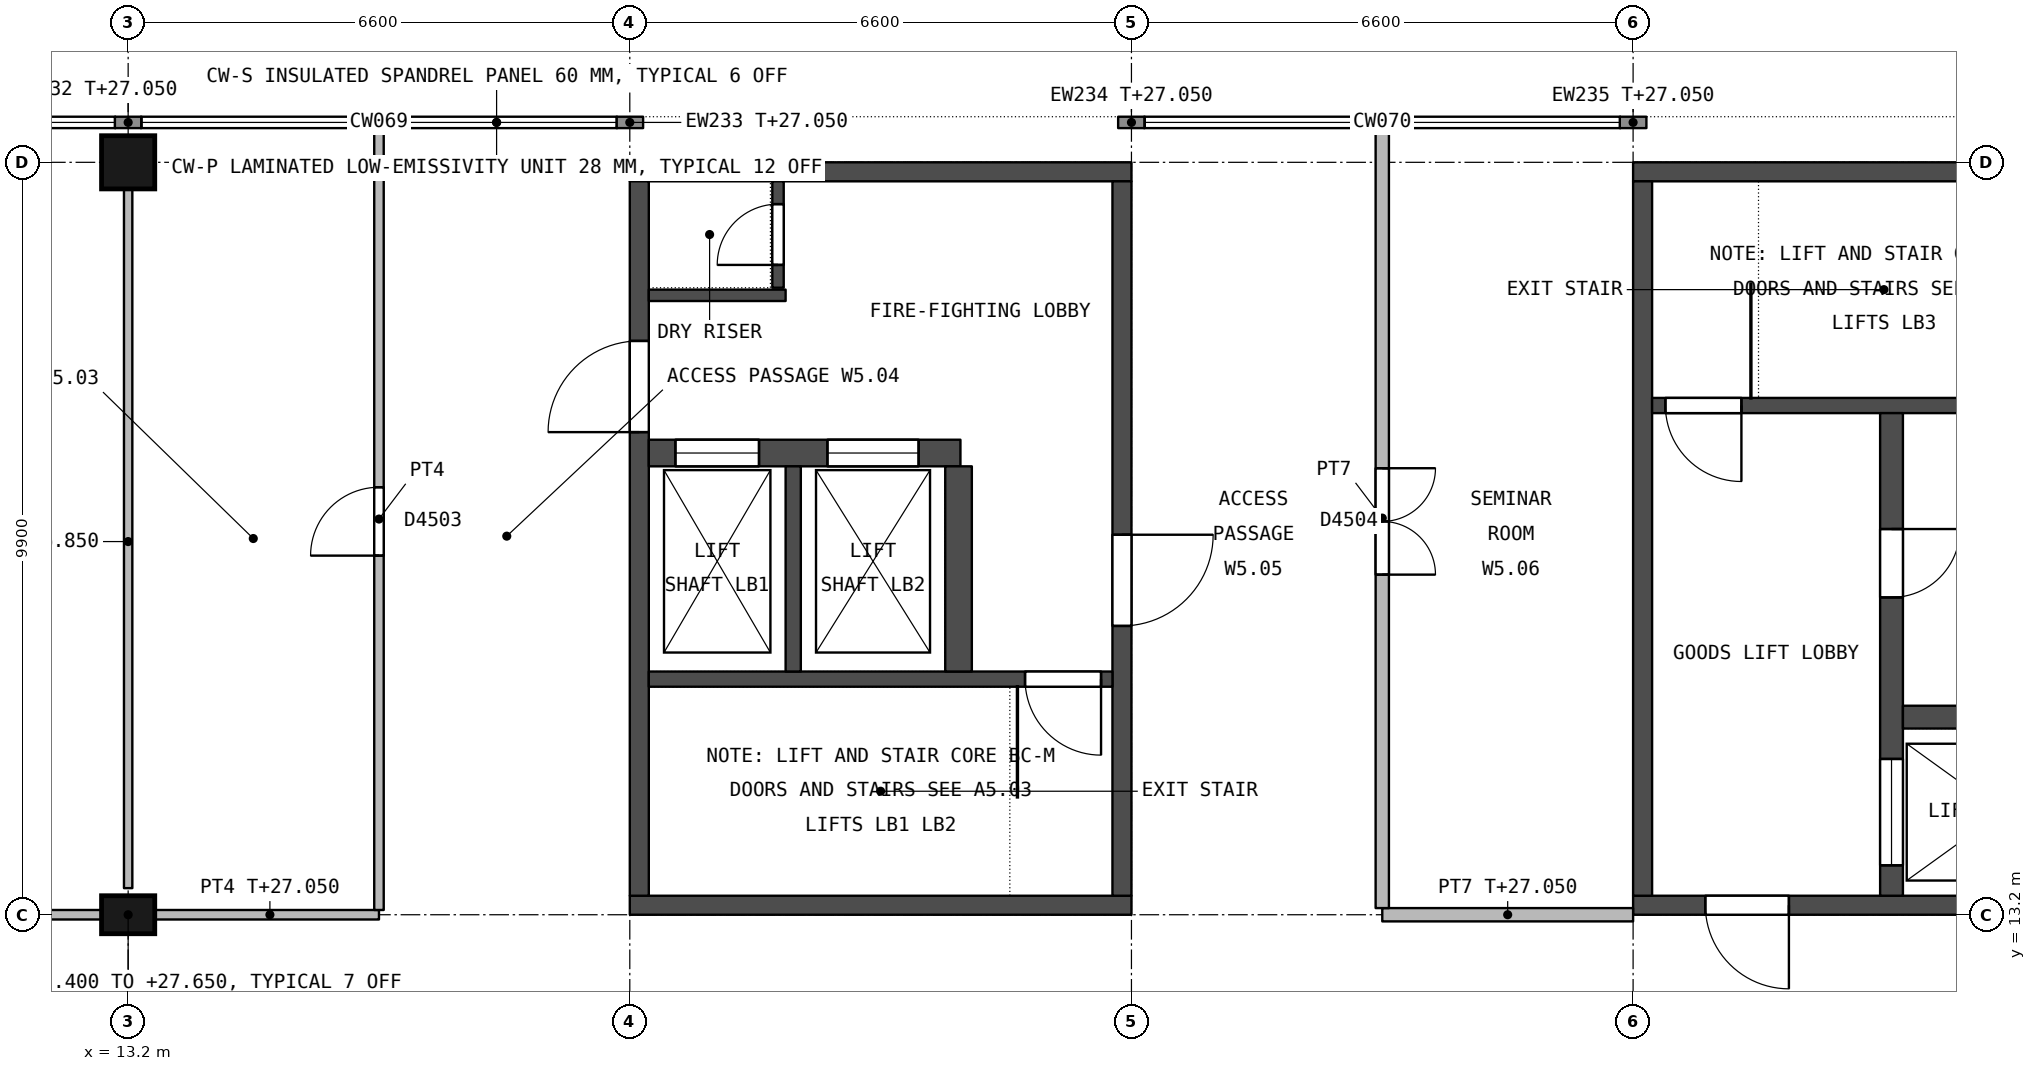
"""IFC4 building model, lengths in metres.
Left out: names, types, materials, properties, quantities, classifications, styles, units other than length and angle.
Written with IfcOpenShell. Run it as: python <this file> out.ifc"""

import sys

from ifc_helpers import new_model, si_unit, direction, frame, frame_2d, origin, origin_2d, place, context, subcontext, project, spatial, rectangle, extrude, element, fill, save


model = new_model("IFC4")
c1 = context("Model", 3, precision=1e-05, world=origin(), true_north=direction((0.0, 1.0)))
c2 = subcontext(c1, "Body", "Model", "MODEL_VIEW")
j1 = project(units=[si_unit("LENGTHUNIT", "METRE"), si_unit("PLANEANGLEUNIT", "RADIAN")], contexts=[c1])
p1 = place(None, origin())
s1 = spatial("IfcSite", under=j1, at=p1, CompositionType="ELEMENT")
p2 = place(p1, origin())
s2 = spatial("IfcBuilding", under=s1, at=p2, CompositionType="ELEMENT")
p3 = place(p2, frame((0.0, 0.0, 23.4)))
s3 = spatial("IfcBuildingStorey", under=s2, at=p3, CompositionType="ELEMENT", Elevation=23.4)
p4 = place(p3, frame((13.2, 13.2, 0.0), z_axis=(0.0, 0.0, 1.0), x_axis=(1.0, 0.0, 0.0)))
e1 = element("IfcColumn", 1, at=p4, inside=s3, PredefinedType="COLUMN", context=c2, shape_type="SweptSolid", body=[
    extrude(rectangle(XDim=0.7, YDim=0.5, at=origin_2d()), origin(), (0.0, 0.0, 1.0), 4.25),
])
p5 = place(p3, frame((13.2, 23.1, 0.0), z_axis=(0.0, 0.0, 1.0), x_axis=(1.0, 0.0, 0.0)))
e2 = element("IfcColumn", 2, at=p5, inside=s3, PredefinedType="COLUMN", context=c2, shape_type="SweptSolid", body=[
    extrude(rectangle(XDim=0.7, YDim=0.7, at=origin_2d()), origin(), (0.0, 0.0, 1.0), 4.25),
])
for number, where, z_axis, x_axis in (
    (3, (19.8, 13.325, 0.0), (0.0, 0.0, 1.0), (1.0, 0.0, 0.0)),
    (4, (19.8, 22.975, 0.0), (0.0, 0.0, 1.0), (1.0, 0.0, 0.0)),
):
    element("IfcWall", number, at=place(p3, frame(where, z_axis=z_axis, x_axis=x_axis)), inside=s3, PredefinedType="SHEAR", context=c2, shape_type="SweptSolid", body=[
        extrude(rectangle(XDim=6.6, YDim=0.25, at=frame_2d((3.3, 0.0))), origin(), (0.0, 0.0, 1.0), 4.25),
    ])
p6 = place(p3, frame((19.925, 13.45, 0.0), z_axis=(0.0, 0.0, 1.0), x_axis=(0.0, 1.0, 0.0)))
e5 = element("IfcWall", 5, at=p6, inside=s3, PredefinedType="SHEAR", context=c2, shape_type="SweptSolid", body=[
    extrude(rectangle(XDim=9.4, YDim=0.25, at=frame_2d((4.7, 0.0))), origin(), (0.0, 0.0, 1.0), 4.25),
])
p7 = place(p6, frame((6.1, 0.0, 0.0)))
e6 = element("IfcOpeningElement", 6, at=p7, cuts=e5, PredefinedType="OPENING", context=c2, shape_type="SweptSolid", body=[
    extrude(rectangle(XDim=1.2, YDim=2.1, at=frame_2d((0.6, 1.05))), frame((0.0, 0.135, 0.0), z_axis=(0.0, -1.0, 0.0), x_axis=(1.0, 0.0, 0.0)), (0.0, 0.0, 1.0), 0.27),
])
p8 = place(p3, frame((26.275, 13.45, 0.0), z_axis=(0.0, 0.0, 1.0), x_axis=(0.0, 1.0, 0.0)))
e7 = element("IfcWall", 7, at=p8, inside=s3, PredefinedType="SHEAR", context=c2, shape_type="SweptSolid", body=[
    extrude(rectangle(XDim=9.4, YDim=0.25, at=frame_2d((4.7, 0.0))), origin(), (0.0, 0.0, 1.0), 4.25),
])
p9 = place(p8, frame((3.55, 0.0, 0.0)))
e8 = element("IfcOpeningElement", 8, at=p9, cuts=e7, PredefinedType="OPENING", context=c2, shape_type="SweptSolid", body=[
    extrude(rectangle(XDim=1.2, YDim=2.1, at=frame_2d((0.6, 1.05))), frame((0.0, 0.135, 0.0), z_axis=(0.0, -1.0, 0.0), x_axis=(1.0, 0.0, 0.0)), (0.0, 0.0, 1.0), 0.27),
])
p10 = place(p3, frame((20.05, 16.3, 0.0), z_axis=(0.0, 0.0, 1.0), x_axis=(1.0, 0.0, 0.0)))
e9 = element("IfcWall", 9, at=p10, inside=s3, PredefinedType="SHEAR", context=c2, shape_type="SweptSolid", body=[
    extrude(rectangle(XDim=6.1, YDim=0.2, at=frame_2d((3.05, 0.0))), origin(), (0.0, 0.0, 1.0), 4.25),
])
p11 = place(p10, frame((4.95, 0.0, 0.0)))
e10 = element("IfcOpeningElement", 10, at=p11, cuts=e9, PredefinedType="OPENING", context=c2, shape_type="SweptSolid", body=[
    extrude(rectangle(XDim=1.0, YDim=2.2, at=frame_2d((0.5, 1.1))), frame((0.0, 0.11, 0.0), z_axis=(0.0, -1.0, 0.0), x_axis=(1.0, 0.0, 0.0)), (0.0, 0.0, 1.0), 0.22),
])
p12 = place(p3, frame((20.05, 19.275, 0.0), z_axis=(0.0, 0.0, 1.0), x_axis=(1.0, 0.0, 0.0)))
e11 = element("IfcWall", 11, at=p12, inside=s3, PredefinedType="SHEAR", context=c2, shape_type="SweptSolid", body=[
    extrude(rectangle(XDim=4.1, YDim=0.35, at=frame_2d((2.05, 0.0))), origin(), (0.0, 0.0, 1.0), 4.25),
])
p13 = place(p12, frame((0.35, 0.0, 0.0)))
e12 = element("IfcOpeningElement", 12, at=p13, cuts=e11, PredefinedType="OPENING", context=c2, shape_type="SweptSolid", body=[
    extrude(rectangle(XDim=1.1, YDim=2.2, at=frame_2d((0.55, 1.1))), frame((0.0, 0.185, 0.0), z_axis=(0.0, -1.0, 0.0), x_axis=(1.0, 0.0, 0.0)), (0.0, 0.0, 1.0), 0.37),
])
p14 = place(p12, frame((2.35, 0.0, 0.0)))
e13 = element("IfcOpeningElement", 13, at=p14, cuts=e11, PredefinedType="OPENING", context=c2, shape_type="SweptSolid", body=[
    extrude(rectangle(XDim=1.2, YDim=2.3, at=frame_2d((0.6, 1.15))), frame((0.0, 0.185, 0.0), z_axis=(0.0, -1.0, 0.0), x_axis=(1.0, 0.0, 0.0)), (0.0, 0.0, 1.0), 0.37),
])
p15 = place(p3, frame((21.95, 16.4, 0.0), z_axis=(0.0, 0.0, 1.0), x_axis=(0.0, 1.0, 0.0)))
e14 = element("IfcWall", 14, at=p15, inside=s3, PredefinedType="SHEAR", context=c2, shape_type="SweptSolid", body=[
    extrude(rectangle(XDim=2.7, YDim=0.2, at=frame_2d((1.35, 0.0))), origin(), (0.0, 0.0, 1.0), 4.25),
])
p16 = place(p3, frame((24.125, 16.4, 0.0), z_axis=(0.0, 0.0, 1.0), x_axis=(0.0, 1.0, 0.0)))
e15 = element("IfcWall", 15, at=p16, inside=s3, PredefinedType="SHEAR", context=c2, shape_type="SweptSolid", body=[
    extrude(rectangle(XDim=2.7, YDim=0.35, at=frame_2d((1.35, 0.0))), origin(), (0.0, 0.0, 1.0), 4.25),
])
p17 = place(p3, frame((20.05, 21.35, 0.0), z_axis=(0.0, 0.0, 1.0), x_axis=(1.0, 0.0, 0.0)))
e16 = element("IfcWall", 16, at=p17, inside=s3, PredefinedType="SHEAR", context=c2, shape_type="SweptSolid", body=[
    extrude(rectangle(XDim=1.8, YDim=0.15, at=frame_2d((0.9, 0.0))), origin(), (0.0, 0.0, 1.0), 4.25),
])
p18 = place(p3, frame((21.75, 21.45, 0.0), z_axis=(0.0, 0.0, 1.0), x_axis=(0.0, 1.0, 0.0)))
e17 = element("IfcWall", 17, at=p18, inside=s3, PredefinedType="SHEAR", context=c2, shape_type="SweptSolid", body=[
    extrude(rectangle(XDim=1.4, YDim=0.15, at=frame_2d((0.7, 0.0))), origin(), (0.0, 0.0, 1.0), 4.25),
])
p19 = place(p18, frame((0.3, 0.0, 0.0)))
e18 = element("IfcOpeningElement", 18, at=p19, cuts=e17, PredefinedType="OPENING", context=c2, shape_type="SweptSolid", body=[
    extrude(rectangle(XDim=0.8, YDim=2.0, at=frame_2d((0.4, 1.0))), frame((0.0, 0.085, 0.0), z_axis=(0.0, -1.0, 0.0), x_axis=(1.0, 0.0, 0.0)), (0.0, 0.0, 1.0), 0.17),
])
p20 = place(p3, frame((33.0, 13.325, 0.0), z_axis=(0.0, 0.0, 1.0), x_axis=(1.0, 0.0, 0.0)))
e19 = element("IfcWall", 19, at=p20, inside=s3, PredefinedType="SHEAR", context=c2, shape_type="SweptSolid", body=[
    extrude(rectangle(XDim=6.6, YDim=0.25, at=frame_2d((3.3, 0.0))), origin(), (0.0, 0.0, 1.0), 4.25),
])
p21 = place(p20, frame((0.95, 0.0, 0.0)))
e20 = element("IfcOpeningElement", 20, at=p21, cuts=e19, PredefinedType="OPENING", context=c2, shape_type="SweptSolid", body=[
    extrude(rectangle(XDim=1.1, YDim=2.1, at=frame_2d((0.55, 1.05))), frame((0.0, 0.135, 0.0), z_axis=(0.0, -1.0, 0.0), x_axis=(1.0, 0.0, 0.0)), (0.0, 0.0, 1.0), 0.27),
])
p22 = place(p3, frame((33.0, 22.975, 0.0), z_axis=(0.0, 0.0, 1.0), x_axis=(1.0, 0.0, 0.0)))
e21 = element("IfcWall", 21, at=p22, inside=s3, PredefinedType="SHEAR", context=c2, shape_type="SweptSolid", body=[
    extrude(rectangle(XDim=6.6, YDim=0.25, at=frame_2d((3.3, 0.0))), origin(), (0.0, 0.0, 1.0), 4.25),
])
p23 = place(p3, frame((33.125, 13.45, 0.0), z_axis=(0.0, 0.0, 1.0), x_axis=(0.0, 1.0, 0.0)))
e22 = element("IfcWall", 22, at=p23, inside=s3, PredefinedType="SHEAR", context=c2, shape_type="SweptSolid", body=[
    extrude(rectangle(XDim=9.4, YDim=0.25, at=frame_2d((4.7, 0.0))), origin(), (0.0, 0.0, 1.0), 4.25),
])
p24 = place(p3, frame((33.25, 19.9, 0.0), z_axis=(0.0, 0.0, 1.0), x_axis=(1.0, 0.0, 0.0)))
e23 = element("IfcWall", 23, at=p24, inside=s3, PredefinedType="SHEAR", context=c2, shape_type="SweptSolid", body=[
    extrude(rectangle(XDim=6.1, YDim=0.2, at=frame_2d((3.05, 0.0))), origin(), (0.0, 0.0, 1.0), 4.25),
])
p25 = place(p24, frame((0.175, 0.0, 0.0)))
e24 = element("IfcOpeningElement", 24, at=p25, cuts=e23, PredefinedType="OPENING", context=c2, shape_type="SweptSolid", body=[
    extrude(rectangle(XDim=1.0, YDim=2.1, at=frame_2d((0.5, 1.05))), frame((0.0, 0.11, 0.0), z_axis=(0.0, -1.0, 0.0), x_axis=(1.0, 0.0, 0.0)), (0.0, 0.0, 1.0), 0.22),
])
p26 = place(p3, frame((36.4, 13.45, 0.0), z_axis=(0.0, 0.0, 1.0), x_axis=(0.0, 1.0, 0.0)))
e25 = element("IfcWall", 25, at=p26, inside=s3, PredefinedType="SHEAR", context=c2, shape_type="SweptSolid", body=[
    extrude(rectangle(XDim=6.35, YDim=0.3, at=frame_2d((3.175, 0.0))), origin(), (0.0, 0.0, 1.0), 4.25),
])
p27 = place(p26, frame((3.925, 0.0, 0.0)))
e26 = element("IfcOpeningElement", 26, at=p27, cuts=e25, PredefinedType="OPENING", context=c2, shape_type="SweptSolid", body=[
    extrude(rectangle(XDim=0.9, YDim=2.1, at=frame_2d((0.45, 1.05))), frame((0.0, 0.16, 0.0), z_axis=(0.0, -1.0, 0.0), x_axis=(1.0, 0.0, 0.0)), (0.0, 0.0, 1.0), 0.32),
])
p28 = place(p26, frame((0.4, 0.0, 0.0)))
e27 = element("IfcOpeningElement", 27, at=p28, cuts=e25, PredefinedType="OPENING", context=c2, shape_type="SweptSolid", body=[
    extrude(rectangle(XDim=1.4, YDim=2.4, at=frame_2d((0.7, 1.2))), frame((0.0, 0.16, 0.0), z_axis=(0.0, -1.0, 0.0), x_axis=(1.0, 0.0, 0.0)), (0.0, 0.0, 1.0), 0.32),
])
p29 = place(p3, frame((36.55, 15.8, 0.0), z_axis=(0.0, 0.0, 1.0), x_axis=(1.0, 0.0, 0.0)))
e28 = element("IfcWall", 28, at=p29, inside=s3, PredefinedType="SHEAR", context=c2, shape_type="SweptSolid", body=[
    extrude(rectangle(XDim=2.8, YDim=0.3, at=frame_2d((1.4, 0.0))), origin(), (0.0, 0.0, 1.0), 4.25),
])
for number, where, z_axis, x_axis in (
    (29, (13.025, 23.625, 0.0), (0.0, 0.0, 1.0), (1.0, 0.0, 0.0)),
    (30, (19.625, 23.625, 0.0), (0.0, 0.0, 1.0), (1.0, 0.0, 0.0)),
):
    element("IfcWall", number, at=place(p3, frame(where, z_axis=z_axis, x_axis=x_axis)), inside=s3, PredefinedType="STANDARD", context=c2, shape_type="SweptSolid", body=[
        extrude(rectangle(XDim=0.35, YDim=0.15, at=frame_2d((0.175, 0.0))), origin(), (0.0, 0.0, 1.0), 3.65),
    ])
p30 = place(p3, frame((26.225, 23.625, 0.0), z_axis=(0.0, 0.0, 1.0), x_axis=(1.0, 0.0, 0.0)))
e31 = element("IfcWall", 31, at=p30, inside=s3, PredefinedType="STANDARD", context=c2, shape_type="SweptSolid", body=[
    extrude(rectangle(XDim=0.35, YDim=0.15, at=frame_2d((0.175, 0.0))), origin(), (0.0, 0.0, 1.0), 3.65),
])
p31 = place(p3, frame((32.825, 23.625, 0.0), z_axis=(0.0, 0.0, 1.0), x_axis=(1.0, 0.0, 0.0)))
e32 = element("IfcWall", 32, at=p31, inside=s3, PredefinedType="STANDARD", context=c2, shape_type="SweptSolid", body=[
    extrude(rectangle(XDim=0.35, YDim=0.15, at=frame_2d((0.175, 0.0))), origin(), (0.0, 0.0, 1.0), 3.65),
])
p32 = place(p3, frame((6.6, 13.2, 0.0), z_axis=(0.0, 0.0, 1.0), x_axis=(1.0, 0.0, 0.0)))
e33 = element("IfcWall", 33, at=p32, inside=s3, PredefinedType="PARTITIONING", context=c2, shape_type="SweptSolid", body=[
    extrude(rectangle(XDim=6.25, YDim=0.125, at=frame_2d((3.125, 0.0))), origin(), (0.0, 0.0, 1.0), 3.65),
])
p33 = place(p32, frame((2.85, 0.0, 0.0)))
e34 = element("IfcOpeningElement", 34, at=p33, cuts=e33, PredefinedType="OPENING", context=c2, shape_type="SweptSolid", body=[
    extrude(rectangle(XDim=0.9, YDim=2.1, at=frame_2d((0.45, 1.05))), frame((0.0, 0.073, 0.0), z_axis=(0.0, -1.0, 0.0), x_axis=(1.0, 0.0, 0.0)), (0.0, 0.0, 1.0), 0.145),
])
p34 = place(p3, frame((16.5, 13.2, 0.0), z_axis=(0.0, 0.0, 1.0), x_axis=(-1.0, 0.0, 0.0)))
e35 = element("IfcWall", 35, at=p34, inside=s3, PredefinedType="PARTITIONING", context=c2, shape_type="SweptSolid", body=[
    extrude(rectangle(XDim=2.95, YDim=0.125, at=frame_2d((1.475, 0.0))), origin(), (0.0, 0.0, 1.0), 3.65),
])
p35 = place(p3, frame((33.0, 13.2, 0.0), z_axis=(0.0, 0.0, 1.0), x_axis=(-1.0, 0.0, 0.0)))
e36 = element("IfcWall", 36, at=p35, inside=s3, PredefinedType="PARTITIONING", context=c2, shape_type="SweptSolid", body=[
    extrude(rectangle(XDim=3.3, YDim=0.175, at=frame_2d((1.65, 0.0))), origin(), (0.0, 0.0, 1.0), 3.65),
])
p36 = place(p3, frame((13.2, 13.55, 0.0), z_axis=(0.0, 0.0, 1.0), x_axis=(0.0, 1.0, 0.0)))
e37 = element("IfcWall", 37, at=p36, inside=s3, PredefinedType="PARTITIONING", context=c2, shape_type="SweptSolid", body=[
    extrude(rectangle(XDim=9.2, YDim=0.11, at=frame_2d((4.6, 0.0))), origin(), (0.0, 0.0, 1.0), 3.45),
])
p37 = place(p3, frame((16.5, 13.262, 0.0), z_axis=(0.0, 0.0, 1.0), x_axis=(0.0, 1.0, 0.0)))
e38 = element("IfcWall", 38, at=p37, inside=s3, PredefinedType="PARTITIONING", context=c2, shape_type="SweptSolid", body=[
    extrude(rectangle(XDim=10.288, YDim=0.125, at=frame_2d((5.144, 0.0))), origin(), (0.0, 0.0, 1.0), 4.25),
])
p38 = place(p37, frame((4.663, 0.0, 0.0)))
e39 = element("IfcOpeningElement", 39, at=p38, cuts=e38, PredefinedType="OPENING", context=c2, shape_type="SweptSolid", body=[
    extrude(rectangle(XDim=0.9, YDim=2.1, at=frame_2d((0.45, 1.05))), frame((0.0, 0.073, 0.0), z_axis=(0.0, -1.0, 0.0), x_axis=(1.0, 0.0, 0.0)), (0.0, 0.0, 1.0), 0.145),
])
p39 = place(p3, frame((29.7, 23.55, 0.0), z_axis=(0.0, 0.0, 1.0), x_axis=(0.0, -1.0, 0.0)))
e40 = element("IfcWall", 40, at=p39, inside=s3, PredefinedType="PARTITIONING", context=c2, shape_type="SweptSolid", body=[
    extrude(rectangle(XDim=10.262, YDim=0.175, at=frame_2d((5.131, 0.0))), origin(), (0.0, 0.0, 1.0), 4.25),
])
p40 = place(p39, frame((4.475, 0.0, 0.0)))
e41 = element("IfcOpeningElement", 41, at=p40, cuts=e40, PredefinedType="OPENING", context=c2, shape_type="SweptSolid", body=[
    extrude(rectangle(XDim=1.4, YDim=2.1, at=frame_2d((0.7, 1.05))), frame((0.0, 0.097, 0.0), z_axis=(0.0, -1.0, 0.0), x_axis=(1.0, 0.0, 0.0)), (0.0, 0.0, 1.0), 0.195),
])
p41 = place(p9, origin())
e42 = element("IfcDoor", 42, at=p41, inside=s3, OperationType="SINGLE_SWING_RIGHT", PredefinedType="DOOR", context=c2, shape_type="SweptSolid", body=[
    extrude(rectangle(XDim=1.2, YDim=2.1, at=frame_2d((0.6, 1.05))), frame((0.0, 0.025, 0.0), z_axis=(0.0, -1.0, 0.0), x_axis=(1.0, 0.0, 0.0)), (0.0, 0.0, 1.0), 0.05),
])
fill(e8, e42)
p42 = place(p7, origin())
e43 = element("IfcDoor", 43, at=p42, inside=s3, OperationType="SINGLE_SWING_LEFT", PredefinedType="DOOR", context=c2, shape_type="SweptSolid", body=[
    extrude(rectangle(XDim=1.2, YDim=2.1, at=frame_2d((0.6, 1.05))), frame((0.0, 0.025, 0.0), z_axis=(0.0, -1.0, 0.0), x_axis=(1.0, 0.0, 0.0)), (0.0, 0.0, 1.0), 0.05),
])
fill(e6, e43)
p43 = place(p11, origin())
e44 = element("IfcDoor", 44, at=p43, inside=s3, OperationType="SINGLE_SWING_RIGHT", PredefinedType="DOOR", context=c2, shape_type="SweptSolid", body=[
    extrude(rectangle(XDim=1.0, YDim=2.2, at=frame_2d((0.5, 1.1))), frame((0.0, 0.025, 0.0), z_axis=(0.0, -1.0, 0.0), x_axis=(1.0, 0.0, 0.0)), (0.0, 0.0, 1.0), 0.05),
])
fill(e10, e44)
p44 = place(p19, origin())
e45 = element("IfcDoor", 45, at=p44, inside=s3, OperationType="SINGLE_SWING_LEFT", PredefinedType="DOOR", context=c2, shape_type="SweptSolid", body=[
    extrude(rectangle(XDim=0.8, YDim=2.0, at=frame_2d((0.4, 1.0))), frame((0.0, 0.025, 0.0), z_axis=(0.0, -1.0, 0.0), x_axis=(1.0, 0.0, 0.0)), (0.0, 0.0, 1.0), 0.05),
])
fill(e18, e45)
p45 = place(p13, origin())
e46 = element("IfcDoor", 46, at=p45, inside=s3, OperationType="DOUBLE_DOOR_SLIDING", PredefinedType="NOTDEFINED", context=c2, shape_type="SweptSolid", body=[
    extrude(rectangle(XDim=1.1, YDim=2.2, at=frame_2d((0.55, 1.1))), frame((0.0, 0.025, 0.0), z_axis=(0.0, -1.0, 0.0), x_axis=(1.0, 0.0, 0.0)), (0.0, 0.0, 1.0), 0.05),
])
fill(e12, e46)
p46 = place(p14, origin())
e47 = element("IfcDoor", 47, at=p46, inside=s3, OperationType="DOUBLE_DOOR_SLIDING", PredefinedType="NOTDEFINED", context=c2, shape_type="SweptSolid", body=[
    extrude(rectangle(XDim=1.2, YDim=2.3, at=frame_2d((0.6, 1.15))), frame((0.0, 0.025, 0.0), z_axis=(0.0, -1.0, 0.0), x_axis=(1.0, 0.0, 0.0)), (0.0, 0.0, 1.0), 0.05),
])
fill(e13, e47)
p47 = place(p27, origin())
e48 = element("IfcDoor", 48, at=p47, inside=s3, OperationType="SINGLE_SWING_RIGHT", PredefinedType="DOOR", context=c2, shape_type="SweptSolid", body=[
    extrude(rectangle(XDim=0.9, YDim=2.1, at=frame_2d((0.45, 1.05))), frame((0.0, 0.025, 0.0), z_axis=(0.0, -1.0, 0.0), x_axis=(1.0, 0.0, 0.0)), (0.0, 0.0, 1.0), 0.05),
])
fill(e26, e48)
p48 = place(p21, origin())
e49 = element("IfcDoor", 49, at=p48, inside=s3, OperationType="SINGLE_SWING_RIGHT", PredefinedType="DOOR", context=c2, shape_type="SweptSolid", body=[
    extrude(rectangle(XDim=1.1, YDim=2.1, at=frame_2d((0.55, 1.05))), frame((0.0, 0.025, 0.0), z_axis=(0.0, -1.0, 0.0), x_axis=(1.0, 0.0, 0.0)), (0.0, 0.0, 1.0), 0.05),
])
fill(e20, e49)
p49 = place(p25, origin())
e50 = element("IfcDoor", 50, at=p49, inside=s3, OperationType="SINGLE_SWING_RIGHT", PredefinedType="DOOR", context=c2, shape_type="SweptSolid", body=[
    extrude(rectangle(XDim=1.0, YDim=2.1, at=frame_2d((0.5, 1.05))), frame((0.0, 0.025, 0.0), z_axis=(0.0, -1.0, 0.0), x_axis=(1.0, 0.0, 0.0)), (0.0, 0.0, 1.0), 0.05),
])
fill(e24, e50)
p50 = place(p28, origin())
e51 = element("IfcDoor", 51, at=p50, inside=s3, OperationType="DOUBLE_DOOR_SLIDING", PredefinedType="NOTDEFINED", context=c2, shape_type="SweptSolid", body=[
    extrude(rectangle(XDim=1.4, YDim=2.4, at=frame_2d((0.7, 1.2))), frame((0.0, 0.025, 0.0), z_axis=(0.0, -1.0, 0.0), x_axis=(1.0, 0.0, 0.0)), (0.0, 0.0, 1.0), 0.05),
])
fill(e27, e51)
p51 = place(p38, origin())
e52 = element("IfcDoor", 52, at=p51, inside=s3, OperationType="SINGLE_SWING_LEFT", PredefinedType="DOOR", context=c2, shape_type="SweptSolid", body=[
    extrude(rectangle(XDim=0.9, YDim=2.1, at=frame_2d((0.45, 1.05))), frame((0.0, 0.027, 0.0), z_axis=(0.0, -1.0, 0.0), x_axis=(1.0, 0.0, 0.0)), (0.0, 0.0, 1.0), 0.054),
])
fill(e39, e52)
p52 = place(p40, origin())
e53 = element("IfcDoor", 53, at=p52, inside=s3, OperationType="DOUBLE_DOOR_SINGLE_SWING", PredefinedType="DOOR", context=c2, shape_type="SweptSolid", body=[
    extrude(rectangle(XDim=1.4, YDim=2.1, at=frame_2d((0.7, 1.05))), frame((0.0, 0.027, 0.0), z_axis=(0.0, -1.0, 0.0), x_axis=(1.0, 0.0, 0.0)), (0.0, 0.0, 1.0), 0.054),
])
fill(e41, e53)
save(model, sys.argv[1])
